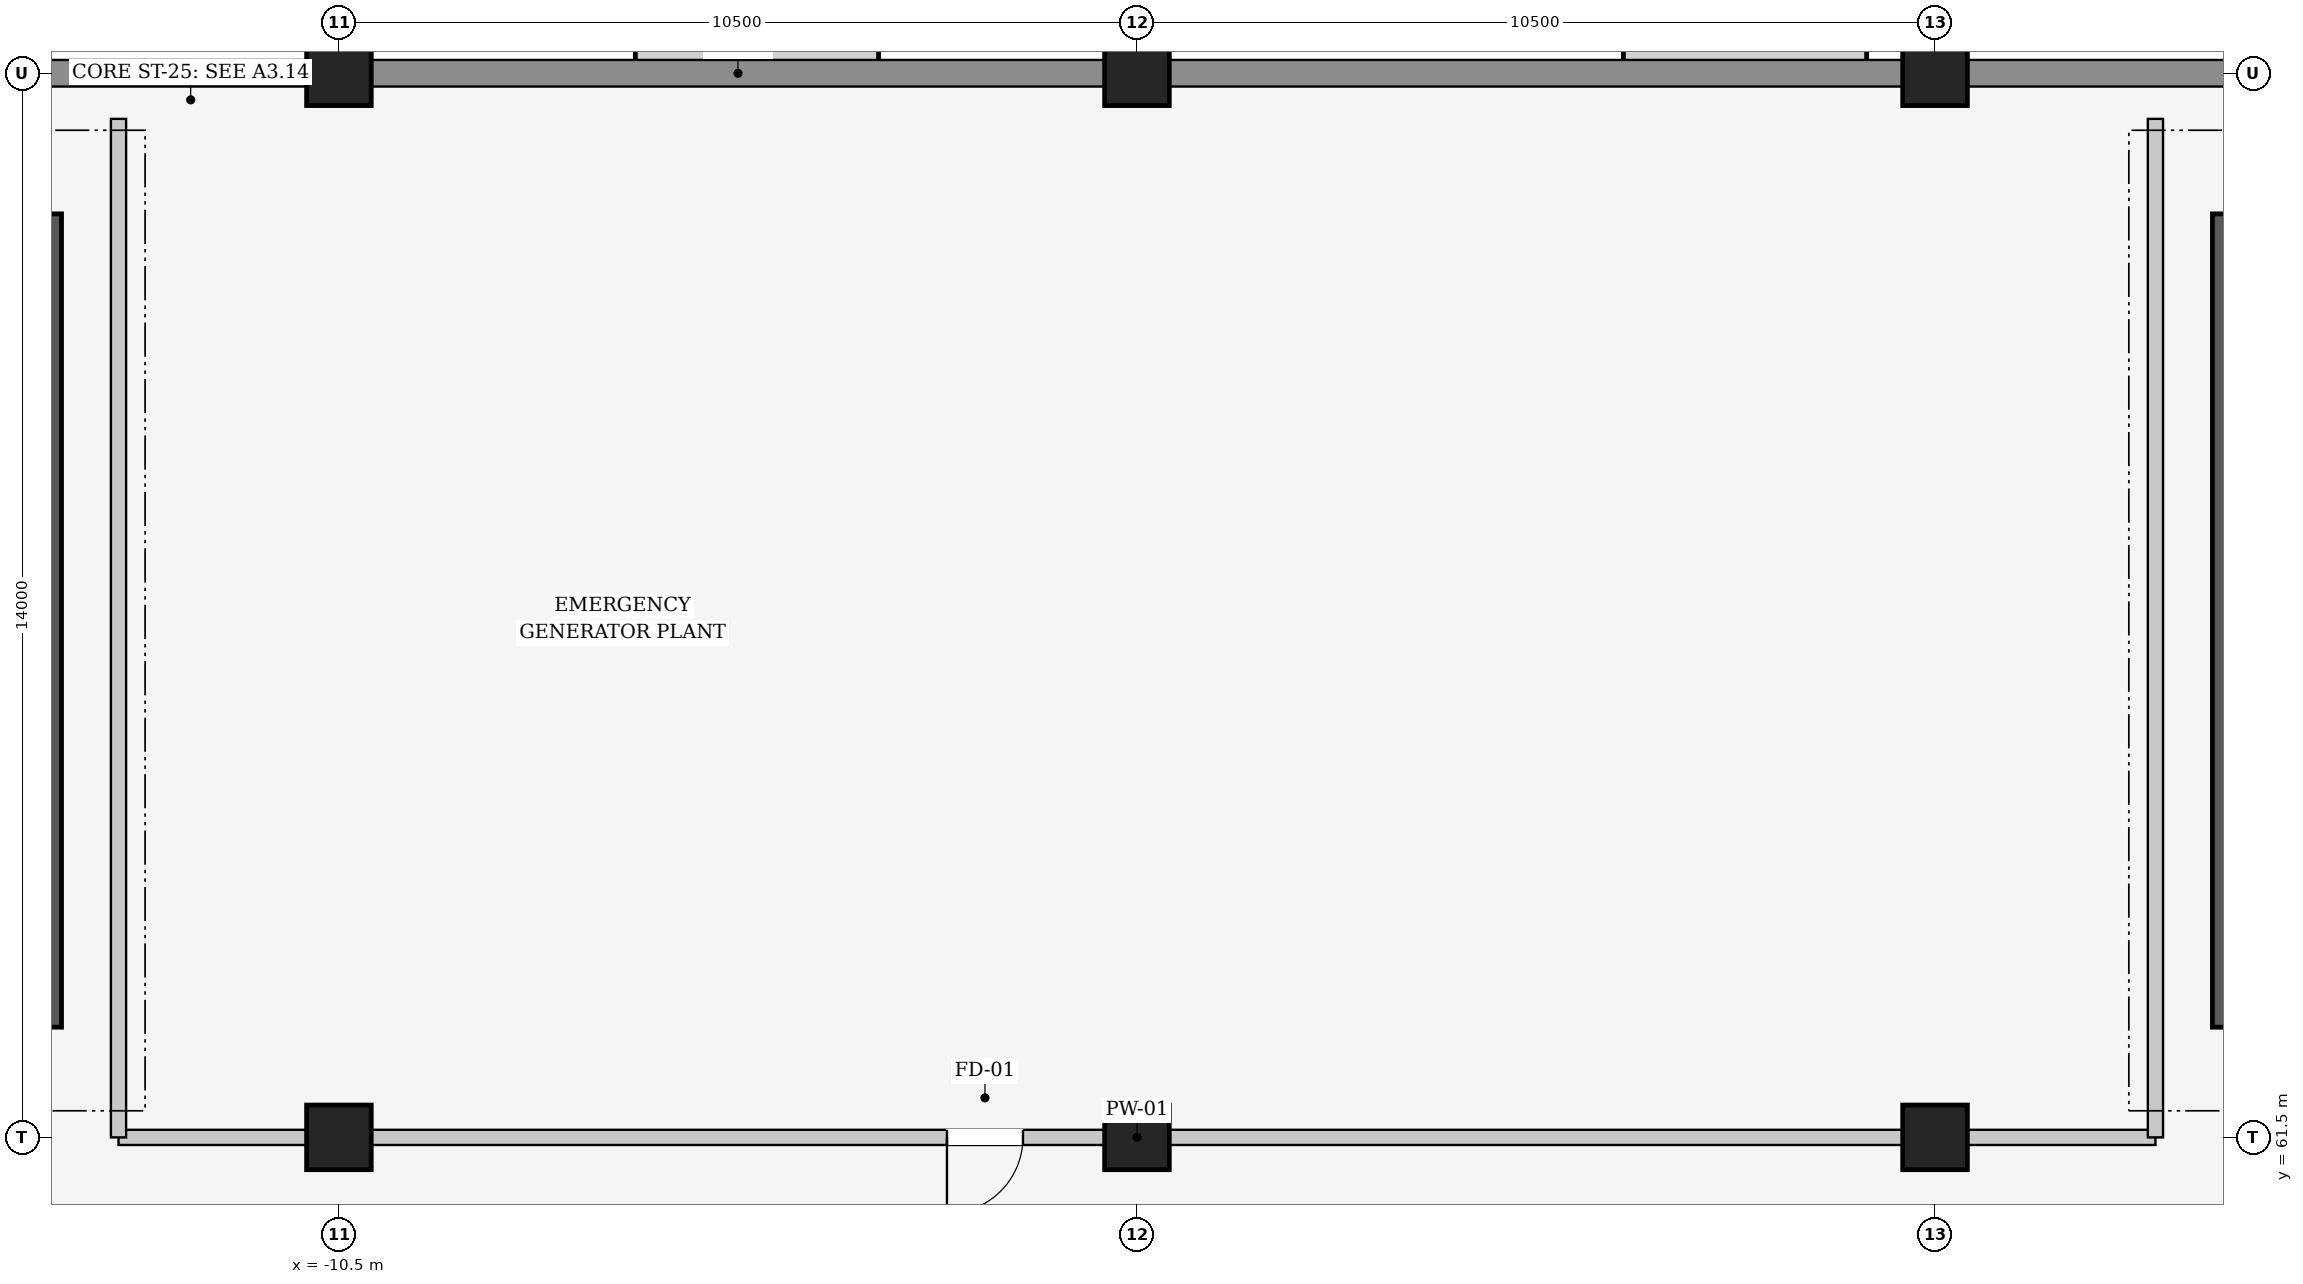
"""IFC4 building model, lengths in metres.
Left out: names, types, materials, properties, quantities, classifications, styles, units other than length and angle.
Written with IfcOpenShell. Run it as: python <this file> out.ifc"""

import sys

from ifc_helpers import new_model, si_unit, direction, frame, frame_2d, origin, origin_2d, place, context, subcontext, project, spatial, rectangle, extrude, element, fill, save


model = new_model("IFC4")
c1 = context("Model", 3, precision=1e-05, world=origin(), true_north=direction((0.0, 1.0)))
c2 = subcontext(c1, "Body", "Model", "MODEL_VIEW")
j1 = project(units=[si_unit("LENGTHUNIT", "METRE"), si_unit("PLANEANGLEUNIT", "RADIAN")], contexts=[c1])
p1 = place(None, origin())
s1 = spatial("IfcSite", under=j1, at=p1, CompositionType="ELEMENT")
p2 = place(p1, origin())
s2 = spatial("IfcBuilding", under=s1, at=p2, CompositionType="ELEMENT")
p3 = place(p2, frame((0.0, 0.0, 6.0)))
s3 = spatial("IfcBuildingStorey", under=s2, at=p3, CompositionType="ELEMENT", Elevation=6.0)
for number, where, z_axis, x_axis in (
    (1, (-10.5, 61.5, 0.0), (0.0, 0.0, 1.0), (1.0, 0.0, 0.0)),
    (2, (-10.5, 75.5, 0.0), (0.0, 0.0, 1.0), (1.0, 0.0, 0.0)),
    (3, (0.0, 61.5, 0.0), (0.0, 0.0, 1.0), (1.0, 0.0, 0.0)),
    (4, (0.0, 75.5, 0.0), (0.0, 0.0, 1.0), (1.0, 0.0, 0.0)),
    (5, (10.5, 61.5, 0.0), (0.0, 0.0, 1.0), (1.0, 0.0, 0.0)),
    (6, (10.5, 75.5, 0.0), (0.0, 0.0, 1.0), (1.0, 0.0, 0.0)),
):
    element("IfcColumn", number, at=place(p3, frame(where, z_axis=z_axis, x_axis=x_axis)), inside=s3, PredefinedType="COLUMN", context=c2, shape_type="SweptSolid", body=[
        extrude(rectangle(XDim=0.85, YDim=0.85, at=origin_2d()), origin(), (0.0, 0.0, 1.0), 5.4),
    ])
for number, where, z_axis, x_axis in (
    (7, (-20.593, 75.5, 0.0), (0.0, 0.0, 1.0), (1.0, 0.0, 0.0)),
    (8, (-10.093, 75.5, 0.0), (0.0, 0.0, 1.0), (1.0, 0.0, 0.0)),
    (9, (0.407, 75.5, 0.0), (0.0, 0.0, 1.0), (1.0, 0.0, 0.0)),
    (10, (10.907, 75.5, 0.0), (0.0, 0.0, 1.0), (1.0, 0.0, 0.0)),
):
    element("IfcWall", number, at=place(p3, frame(where, z_axis=z_axis, x_axis=x_axis)), inside=s3, PredefinedType="SOLIDWALL", context=c2, shape_type="SweptSolid", body=[
        extrude(rectangle(XDim=9.686, YDim=0.35, at=frame_2d((4.843, 0.0))), origin(), (0.0, 0.0, 1.0), 4.22),
    ])
for number, where, z_axis, x_axis in (
    (11, (-14.275, 73.65, 0.0), (0.0, 0.0, 1.0), (0.0, -1.0, 0.0)),
    (12, (14.275, 62.95, 0.0), (0.0, 0.0, 1.0), (0.0, 1.0, 0.0)),
):
    element("IfcWall", number, at=place(p3, frame(where, z_axis=z_axis, x_axis=x_axis)), inside=s3, PredefinedType="SHEAR", context=c2, shape_type="SweptSolid", body=[
        extrude(rectangle(XDim=10.7, YDim=0.25, at=frame_2d((5.35, 0.0))), origin(), (0.0, 0.0, 1.0), 5.4),
    ])
p4 = place(p3, frame((13.4, 61.5, 0.0), z_axis=(0.0, 0.0, 1.0), x_axis=(-1.0, 0.0, 0.0)))
e13 = element("IfcWall", 13, at=p4, inside=s3, PredefinedType="PARTITIONING", context=c2, shape_type="SweptSolid", body=[
    extrude(rectangle(XDim=26.8, YDim=0.2, at=frame_2d((13.4, 0.0))), origin(), (0.0, 0.0, 1.0), 4.205),
])
p5 = place(p4, frame((14.9, 0.0, 0.0)))
e14 = element("IfcOpeningElement", 14, at=p5, cuts=e13, PredefinedType="OPENING", context=c2, shape_type="SweptSolid", body=[
    extrude(rectangle(XDim=1.0, YDim=2.15, at=frame_2d((0.5, 1.075))), frame((0.0, 0.11, 0.0), z_axis=(0.0, -1.0, 0.0), x_axis=(1.0, 0.0, 0.0)), (0.0, 0.0, 1.0), 0.22),
])
for number, where, z_axis, x_axis in (
    (15, (13.4, 74.9, 0.0), (0.0, 0.0, 1.0), (0.0, -1.0, 0.0)),
    (16, (-13.4, 61.5, 0.0), (0.0, 0.0, 1.0), (0.0, 1.0, 0.0)),
):
    element("IfcWall", number, at=place(p3, frame(where, z_axis=z_axis, x_axis=x_axis)), inside=s3, PredefinedType="PARTITIONING", context=c2, shape_type="SweptSolid", body=[
        extrude(rectangle(XDim=13.4, YDim=0.2, at=frame_2d((6.7, 0.0))), origin(), (0.0, 0.0, 1.0), 4.205),
    ])
p6 = place(p5, origin())
e17 = element("IfcDoor", 17, at=p6, inside=s3, OperationType="SINGLE_SWING_RIGHT", PredefinedType="DOOR", context=c2, shape_type="SweptSolid", body=[
    extrude(rectangle(XDim=1.0, YDim=2.15, at=frame_2d((0.5, 1.075))), frame((0.0, 0.025, 0.0), z_axis=(0.0, -1.0, 0.0), x_axis=(1.0, 0.0, 0.0)), (0.0, 0.0, 1.0), 0.05),
])
fill(e14, e17)
save(model, sys.argv[1])
